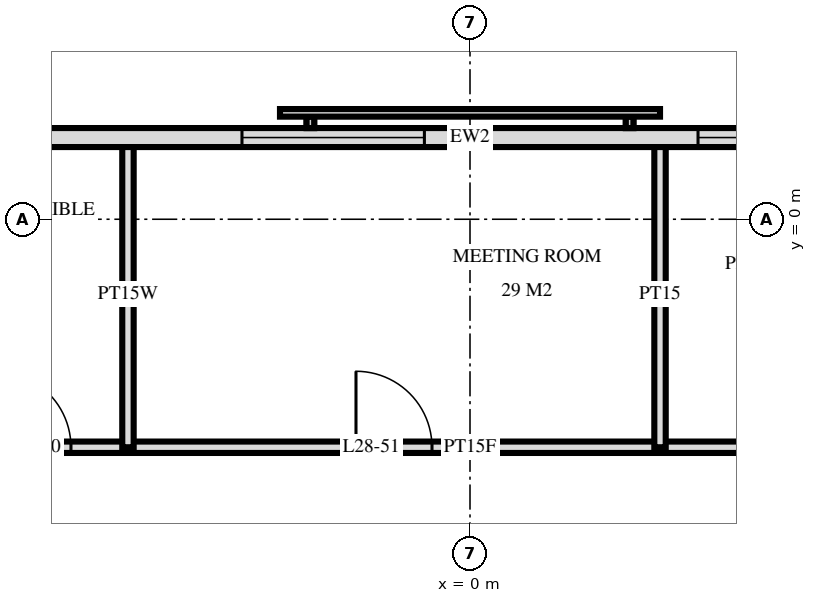
"""IFC4 building model, lengths in metres.
Left out: names, types, materials, properties, quantities, classifications, styles, units other than length and angle.
Written with IfcOpenShell. Run it as: python <this file> out.ifc"""

import sys

from ifc_helpers import new_model, si_unit, direction, frame, frame_2d, origin, place, context, subcontext, project, spatial, rectangle, extrude, element, fill, save


model = new_model("IFC4")
c1 = context("Model", 3, precision=1e-05, world=origin(), true_north=direction((0.0, 1.0)))
c2 = subcontext(c1, "Body", "Model", "MODEL_VIEW")
j1 = project(units=[si_unit("LENGTHUNIT", "METRE"), si_unit("PLANEANGLEUNIT", "RADIAN")], contexts=[c1])
p1 = place(None, origin())
s1 = spatial("IfcSite", under=j1, at=p1, CompositionType="ELEMENT")
p2 = place(p1, origin())
s2 = spatial("IfcBuilding", under=s1, at=p2, CompositionType="ELEMENT")
p3 = place(p2, frame((0.0, 0.0, 112.8)))
s3 = spatial("IfcBuildingStorey", under=s2, at=p3, CompositionType="ELEMENT", Elevation=112.8)
p4 = place(p3, frame((23.675, 1.075, 0.0), z_axis=(0.0, 0.0, 1.0), x_axis=(-1.0, 0.0, 0.0)))
e1 = element("IfcWall", 1, at=p4, inside=s3, PredefinedType="SOLIDWALL", context=c2, shape_type="SweptSolid", body=[
    extrude(rectangle(XDim=47.351, YDim=0.25, at=frame_2d((23.675, 0.0))), origin(), (0.0, 0.0, 1.0), 3.32),
])
p5 = place(p4, frame((15.275, 0.0, 0.3)))
e2 = element("IfcOpeningElement", 2, at=p5, cuts=e1, PredefinedType="OPENING", context=c2, shape_type="SweptSolid", body=[
    extrude(rectangle(XDim=2.4, YDim=2.1, at=frame_2d((1.2, 1.05))), frame((0.0, 0.135, 0.0), z_axis=(0.0, -1.0, 0.0), x_axis=(1.0, 0.0, 0.0)), (0.0, 0.0, 1.0), 0.27),
])
p6 = place(p4, frame((18.275, 0.0, 0.3)))
e3 = element("IfcOpeningElement", 3, at=p6, cuts=e1, PredefinedType="OPENING", context=c2, shape_type="SweptSolid", body=[
    extrude(rectangle(XDim=2.4, YDim=2.1, at=frame_2d((1.2, 1.05))), frame((0.0, 0.135, 0.0), z_axis=(0.0, -1.0, 0.0), x_axis=(1.0, 0.0, 0.0)), (0.0, 0.0, 1.0), 0.27),
])
p7 = place(p4, frame((24.275, 0.0, 0.3)))
e4 = element("IfcOpeningElement", 4, at=p7, cuts=e1, PredefinedType="OPENING", context=c2, shape_type="SweptSolid", body=[
    extrude(rectangle(XDim=2.4, YDim=2.1, at=frame_2d((1.2, 1.05))), frame((0.0, 0.135, 0.0), z_axis=(0.0, -1.0, 0.0), x_axis=(1.0, 0.0, 0.0)), (0.0, 0.0, 1.0), 0.27),
])
p8 = place(p3, frame((2.5, -3.0, 0.0), z_axis=(0.0, 0.0, 1.0), x_axis=(0.0, 1.0, 0.0)))
e5 = element("IfcWall", 5, at=p8, inside=s3, PredefinedType="PARTITIONING", context=c2, shape_type="SweptSolid", body=[
    extrude(rectangle(XDim=4.02, YDim=0.15, at=frame_2d((2.01, 0.0))), origin(), (0.0, 0.0, 1.0), 3.32),
])
p9 = place(p3, frame((-4.5, -3.0, 0.0), z_axis=(0.0, 0.0, 1.0), x_axis=(0.0, 1.0, 0.0)))
e6 = element("IfcWall", 6, at=p9, inside=s3, PredefinedType="PLUMBINGWALL", context=c2, shape_type="SweptSolid", body=[
    extrude(rectangle(XDim=4.02, YDim=0.15, at=frame_2d((2.01, 0.0))), origin(), (0.0, 0.0, 1.0), 3.32),
])
p10 = place(p3, frame((-9.95, -3.0, 0.0), z_axis=(0.0, 0.0, 1.0), x_axis=(1.0, 0.0, 0.0)))
e7 = element("IfcWall", 7, at=p10, inside=s3, PredefinedType="PARTITIONING", context=c2, shape_type="SweptSolid", body=[
    extrude(rectangle(XDim=19.9, YDim=0.15, at=frame_2d((9.95, 0.0))), origin(), (0.0, 0.0, 1.0), 3.32),
])
p11 = place(p10, frame((0.95, 0.0, 0.0)))
e8 = element("IfcOpeningElement", 8, at=p11, cuts=e7, PredefinedType="OPENING", context=c2, shape_type="SweptSolid", body=[
    extrude(rectangle(XDim=1.0, YDim=2.1, at=frame_2d((0.5, 1.05))), frame((0.0, 0.085, 0.0), z_axis=(0.0, -1.0, 0.0), x_axis=(1.0, 0.0, 0.0)), (0.0, 0.0, 1.0), 0.17),
])
p12 = place(p10, frame((3.7, 0.0, 0.0)))
e9 = element("IfcOpeningElement", 9, at=p12, cuts=e7, PredefinedType="OPENING", context=c2, shape_type="SweptSolid", body=[
    extrude(rectangle(XDim=1.0, YDim=2.1, at=frame_2d((0.5, 1.05))), frame((0.0, 0.085, 0.0), z_axis=(0.0, -1.0, 0.0), x_axis=(1.0, 0.0, 0.0)), (0.0, 0.0, 1.0), 0.17),
])
p13 = place(p10, frame((8.45, 0.0, 0.0)))
e10 = element("IfcOpeningElement", 10, at=p13, cuts=e7, PredefinedType="OPENING", context=c2, shape_type="SweptSolid", body=[
    extrude(rectangle(XDim=1.0, YDim=2.1, at=frame_2d((0.5, 1.05))), frame((0.0, 0.085, 0.0), z_axis=(0.0, -1.0, 0.0), x_axis=(1.0, 0.0, 0.0)), (0.0, 0.0, 1.0), 0.17),
])
p14 = place(p10, frame((15.7, 0.0, 0.0)))
e11 = element("IfcOpeningElement", 11, at=p14, cuts=e7, PredefinedType="OPENING", context=c2, shape_type="SweptSolid", body=[
    extrude(rectangle(XDim=1.0, YDim=2.1, at=frame_2d((0.5, 1.05))), frame((0.0, 0.085, 0.0), z_axis=(0.0, -1.0, 0.0), x_axis=(1.0, 0.0, 0.0)), (0.0, 0.0, 1.0), 0.17),
])
p15 = place(p6, origin())
e12 = element("IfcWindow", 12, at=p15, inside=s3, PartitioningType="SINGLE_PANEL", PredefinedType="WINDOW", context=c2, shape_type="SweptSolid", body=[
    extrude(rectangle(XDim=2.4, YDim=2.1, at=frame_2d((1.2, 1.05))), frame((0.0, 0.03, 0.0), z_axis=(0.0, -1.0, 0.0), x_axis=(1.0, 0.0, 0.0)), (0.0, 0.0, 1.0), 0.06),
])
fill(e3, e12)
p16 = place(p7, origin())
e13 = element("IfcWindow", 13, at=p16, inside=s3, PartitioningType="SINGLE_PANEL", PredefinedType="WINDOW", context=c2, shape_type="SweptSolid", body=[
    extrude(rectangle(XDim=2.4, YDim=2.1, at=frame_2d((1.2, 1.05))), frame((0.0, 0.03, 0.0), z_axis=(0.0, -1.0, 0.0), x_axis=(1.0, 0.0, 0.0)), (0.0, 0.0, 1.0), 0.06),
])
fill(e4, e13)
p17 = place(p12, origin())
e14 = element("IfcDoor", 14, at=p17, inside=s3, OperationType="SINGLE_SWING_RIGHT", PredefinedType="DOOR", context=c2, shape_type="SweptSolid", body=[
    extrude(rectangle(XDim=1.0, YDim=2.1, at=frame_2d((0.5, 1.05))), frame((0.0, 0.025, 0.0), z_axis=(0.0, -1.0, 0.0), x_axis=(1.0, 0.0, 0.0)), (0.0, 0.0, 1.0), 0.05),
])
fill(e9, e14)
p18 = place(p13, origin())
e15 = element("IfcDoor", 15, at=p18, inside=s3, OperationType="SINGLE_SWING_RIGHT", PredefinedType="DOOR", context=c2, shape_type="SweptSolid", body=[
    extrude(rectangle(XDim=1.0, YDim=2.1, at=frame_2d((0.5, 1.05))), frame((0.0, 0.025, 0.0), z_axis=(0.0, -1.0, 0.0), x_axis=(1.0, 0.0, 0.0)), (0.0, 0.0, 1.0), 0.05),
])
fill(e10, e15)
save(model, sys.argv[1])
